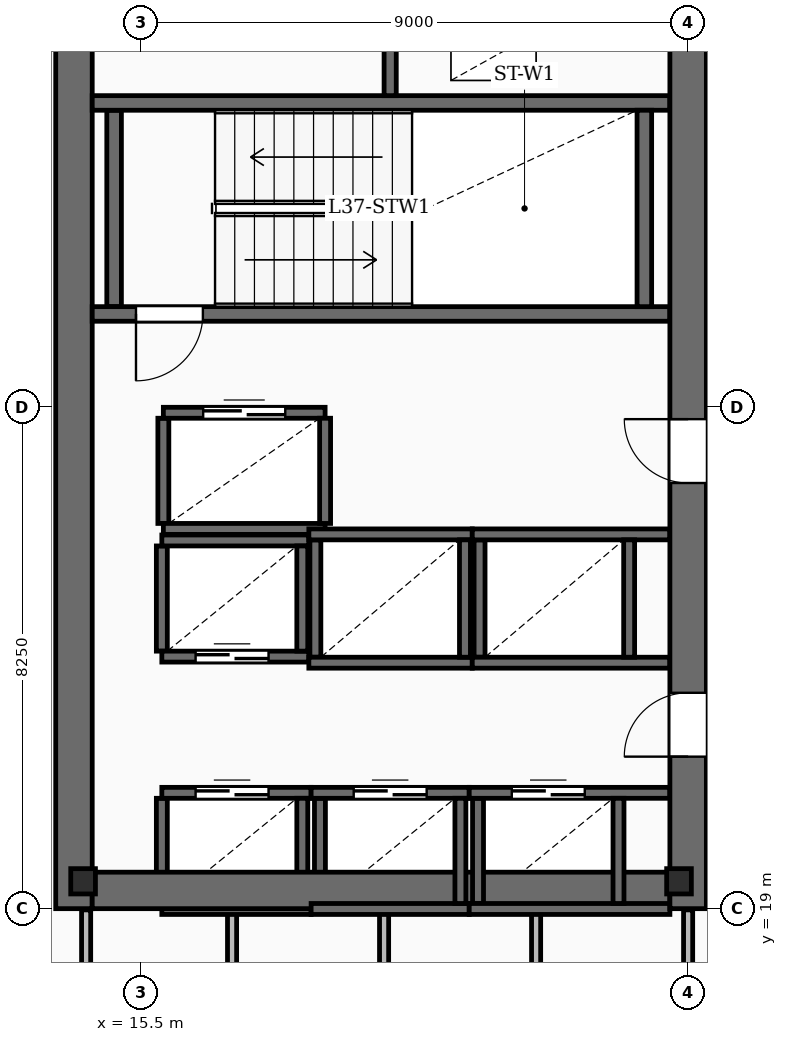
"""IFC4 building model, lengths in metres.
Left out: names, types, materials, properties, quantities, classifications, styles, units other than length and angle.
Written with IfcOpenShell. Run it as: python <this file> out.ifc"""

import sys

from ifc_helpers import new_model, si_unit, direction, frame, frame_2d, origin, origin_2d, place, context, subcontext, project, spatial, rectangle, i_section, extrude, element, fill, save


model = new_model("IFC4")
c1 = context("Model", 3, precision=1e-05, world=origin(), true_north=direction((0.0, 1.0)))
c2 = subcontext(c1, "Body", "Model", "MODEL_VIEW")
j1 = project(units=[si_unit("LENGTHUNIT", "METRE"), si_unit("PLANEANGLEUNIT", "RADIAN")], contexts=[c1])
p1 = place(None, origin())
s1 = spatial("IfcSite", under=j1, at=p1, CompositionType="ELEMENT")
p2 = place(p1, origin())
s2 = spatial("IfcBuilding", under=s1, at=p2, CompositionType="ELEMENT")
p3 = place(p2, frame((0.0, 0.0, 158.45)))
s3 = spatial("IfcBuildingStorey", under=s2, at=p3, CompositionType="ELEMENT", Elevation=158.45)
p4 = place(p3, frame((14.4, 19.0, -0.45), z_axis=(0.0, 0.0, 1.0), x_axis=(0.0, 1.0, 0.0)))
e1 = element("IfcWall", 1, at=p4, inside=s3, PredefinedType="SHEAR", context=c2, shape_type="SweptSolid", body=[
    extrude(rectangle(XDim=15.3, YDim=0.6, at=frame_2d((7.65, 0.0))), origin(), (0.0, 0.0, 1.0), 3.93),
])
p5 = place(p3, frame((24.5, 19.0, -0.45), z_axis=(0.0, 0.0, 1.0), x_axis=(0.0, 1.0, 0.0)))
e2 = element("IfcWall", 2, at=p5, inside=s3, PredefinedType="SHEAR", context=c2, shape_type="SweptSolid", body=[
    extrude(rectangle(XDim=15.3, YDim=0.6, at=frame_2d((7.65, 0.0))), origin(), (0.0, 0.0, 1.0), 3.93),
])
p6 = place(p5, frame((2.5, 0.0, 0.45)))
e3 = element("IfcOpeningElement", 3, at=p6, cuts=e2, PredefinedType="OPENING", context=c2, shape_type="SweptSolid", body=[
    extrude(rectangle(XDim=1.05, YDim=2.15, at=frame_2d((0.525, 1.075))), frame((0.0, 0.31, 0.0), z_axis=(0.0, -1.0, 0.0), x_axis=(1.0, 0.0, 0.0)), (0.0, 0.0, 1.0), 0.62),
])
p7 = place(p5, frame((7.0, 0.0, 0.45)))
e4 = element("IfcOpeningElement", 4, at=p7, cuts=e2, PredefinedType="OPENING", context=c2, shape_type="SweptSolid", body=[
    extrude(rectangle(XDim=1.05, YDim=2.15, at=frame_2d((0.525, 1.075))), frame((0.0, 0.31, 0.0), z_axis=(0.0, -1.0, 0.0), x_axis=(1.0, 0.0, 0.0)), (0.0, 0.0, 1.0), 0.62),
])
p8 = place(p3, frame((14.7, 19.3, -0.45), z_axis=(0.0, 0.0, 1.0), x_axis=(1.0, 0.0, 0.0)))
e5 = element("IfcWall", 5, at=p8, inside=s3, PredefinedType="SHEAR", context=c2, shape_type="SweptSolid", body=[
    extrude(rectangle(XDim=9.5, YDim=0.6, at=frame_2d((4.75, 0.0))), origin(), (0.0, 0.0, 1.0), 3.93),
])
for number, where, z_axis, x_axis in (
    (6, (14.55, 19.45, -0.45), (0.0, 0.0, 1.0), (1.0, 0.0, 0.0)),
    (7, (24.35, 19.45, -0.45), (0.0, 0.0, 1.0), (1.0, 0.0, 0.0)),
):
    element("IfcColumn", number, at=place(p3, frame(where, z_axis=z_axis, x_axis=x_axis)), inside=s3, PredefinedType="COLUMN", context=c2, shape_type="SweptSolid", body=[
        extrude(i_section(OverallWidth=0.406, OverallDepth=0.416, WebThickness=0.03, FlangeThickness=0.048, FilletRadius=0.02, at=origin_2d()), origin(), (0.0, 0.0, 1.0), 3.93),
    ])
p9 = place(p3, frame((24.2, 28.78, 0.0), z_axis=(0.0, 0.0, 1.0), x_axis=(-1.0, 0.0, 0.0)))
e8 = element("IfcWall", 8, at=p9, inside=s3, PredefinedType="SOLIDWALL", context=c2, shape_type="SweptSolid", body=[
    extrude(rectangle(XDim=9.5, YDim=0.24, at=frame_2d((4.75, 0.0))), origin(), (0.0, 0.0, 1.0), 3.48),
])
p10 = place(p9, frame((7.68, 0.0, 0.0)))
e9 = element("IfcOpeningElement", 9, at=p10, cuts=e8, PredefinedType="OPENING", context=c2, shape_type="SweptSolid", body=[
    extrude(rectangle(XDim=1.1, YDim=2.15, at=frame_2d((0.55, 1.075))), frame((0.0, 0.13, 0.0), z_axis=(0.0, -1.0, 0.0), x_axis=(1.0, 0.0, 0.0)), (0.0, 0.0, 1.0), 0.26),
])
p11 = place(p3, frame((14.7, 32.25, 0.0), z_axis=(0.0, 0.0, 1.0), x_axis=(1.0, 0.0, 0.0)))
e10 = element("IfcWall", 10, at=p11, inside=s3, PredefinedType="SOLIDWALL", context=c2, shape_type="SweptSolid", body=[
    extrude(rectangle(XDim=9.5, YDim=0.24, at=frame_2d((4.75, 0.0))), origin(), (0.0, 0.0, 1.0), 3.48),
])
for number, where, z_axis, x_axis in (
    (11, (15.06, 28.9, 0.0), (0.0, 0.0, 1.0), (0.0, 1.0, 0.0)),
    (12, (23.78, 28.9, 0.0), (0.0, 0.0, 1.0), (0.0, 1.0, 0.0)),
):
    element("IfcWall", number, at=place(p3, frame(where, z_axis=z_axis, x_axis=x_axis)), inside=s3, PredefinedType="SOLIDWALL", context=c2, shape_type="SweptSolid", body=[
        extrude(rectangle(XDim=3.23, YDim=0.24, at=frame_2d((1.615, 0.0))), origin(), (0.0, 0.0, 1.0), 3.48),
    ])
p12 = place(p3, frame((19.6, 32.37, 0.0), z_axis=(0.0, 0.0, 1.0), x_axis=(0.0, 1.0, 0.0)))
e13 = element("IfcWall", 13, at=p12, inside=s3, PredefinedType="SOLIDWALL", context=c2, shape_type="SweptSolid", body=[
    extrude(rectangle(XDim=1.28, YDim=0.2, at=frame_2d((0.64, 0.0))), origin(), (0.0, 0.0, 1.0), 3.48),
])
p13 = place(p3, frame((15.845, 20.905, 0.0), z_axis=(0.0, 0.0, 1.0), x_axis=(1.0, 0.0, 0.0)))
e14 = element("IfcWall", 14, at=p13, inside=s3, PredefinedType="SOLIDWALL", context=c2, shape_type="SweptSolid", body=[
    extrude(rectangle(XDim=2.455, YDim=0.18, at=frame_2d((1.228, 0.0))), origin(), (0.0, 0.0, 1.0), 3.48),
])
p14 = place(p13, frame((0.555, 0.0, 0.0)))
e15 = element("IfcOpeningElement", 15, at=p14, cuts=e14, PredefinedType="OPENING", context=c2, shape_type="SweptSolid", body=[
    extrude(rectangle(XDim=1.2, YDim=2.2, at=frame_2d((0.6, 1.1))), frame((0.0, 0.1, 0.0), z_axis=(0.0, -1.0, 0.0), x_axis=(1.0, 0.0, 0.0)), (0.0, 0.0, 1.0), 0.2),
])
p15 = place(p3, frame((15.845, 18.995, 0.0), z_axis=(0.0, 0.0, 1.0), x_axis=(1.0, 0.0, 0.0)))
e16 = element("IfcWall", 16, at=p15, inside=s3, PredefinedType="SOLIDWALL", context=c2, shape_type="SweptSolid", body=[
    extrude(rectangle(XDim=2.455, YDim=0.18, at=frame_2d((1.228, 0.0))), origin(), (0.0, 0.0, 1.0), 3.48),
])
for number, where, z_axis, x_axis in (
    (17, (15.845, 19.085, 0.0), (0.0, 0.0, 1.0), (0.0, 1.0, 0.0)),
    (18, (18.155, 19.085, 0.0), (0.0, 0.0, 1.0), (0.0, 1.0, 0.0)),
):
    element("IfcWall", number, at=place(p3, frame(where, z_axis=z_axis, x_axis=x_axis)), inside=s3, PredefinedType="SOLIDWALL", context=c2, shape_type="SweptSolid", body=[
        extrude(rectangle(XDim=1.73, YDim=0.18, at=frame_2d((0.865, 0.0))), origin(), (0.0, 0.0, 1.0), 3.48),
    ])
p16 = place(p3, frame((18.3, 20.905, 0.0), z_axis=(0.0, 0.0, 1.0), x_axis=(1.0, 0.0, 0.0)))
e19 = element("IfcWall", 19, at=p16, inside=s3, PredefinedType="SOLIDWALL", context=c2, shape_type="SweptSolid", body=[
    extrude(rectangle(XDim=2.6, YDim=0.18, at=frame_2d((1.3, 0.0))), origin(), (0.0, 0.0, 1.0), 3.48),
])
p17 = place(p16, frame((0.7, 0.0, 0.0)))
e20 = element("IfcOpeningElement", 20, at=p17, cuts=e19, PredefinedType="OPENING", context=c2, shape_type="SweptSolid", body=[
    extrude(rectangle(XDim=1.2, YDim=2.2, at=frame_2d((0.6, 1.1))), frame((0.0, 0.1, 0.0), z_axis=(0.0, -1.0, 0.0), x_axis=(1.0, 0.0, 0.0)), (0.0, 0.0, 1.0), 0.2),
])
p18 = place(p3, frame((18.3, 18.995, 0.0), z_axis=(0.0, 0.0, 1.0), x_axis=(1.0, 0.0, 0.0)))
e21 = element("IfcWall", 21, at=p18, inside=s3, PredefinedType="SOLIDWALL", context=c2, shape_type="SweptSolid", body=[
    extrude(rectangle(XDim=2.6, YDim=0.18, at=frame_2d((1.3, 0.0))), origin(), (0.0, 0.0, 1.0), 3.48),
])
for number, where, z_axis, x_axis in (
    (22, (18.445, 19.085, 0.0), (0.0, 0.0, 1.0), (0.0, 1.0, 0.0)),
    (23, (20.755, 19.085, 0.0), (0.0, 0.0, 1.0), (0.0, 1.0, 0.0)),
):
    element("IfcWall", number, at=place(p3, frame(where, z_axis=z_axis, x_axis=x_axis)), inside=s3, PredefinedType="SOLIDWALL", context=c2, shape_type="SweptSolid", body=[
        extrude(rectangle(XDim=1.73, YDim=0.18, at=frame_2d((0.865, 0.0))), origin(), (0.0, 0.0, 1.0), 3.48),
    ])
p19 = place(p3, frame((20.9, 20.905, 0.0), z_axis=(0.0, 0.0, 1.0), x_axis=(1.0, 0.0, 0.0)))
e24 = element("IfcWall", 24, at=p19, inside=s3, PredefinedType="SOLIDWALL", context=c2, shape_type="SweptSolid", body=[
    extrude(rectangle(XDim=3.3, YDim=0.18, at=frame_2d((1.65, 0.0))), origin(), (0.0, 0.0, 1.0), 3.48),
])
p20 = place(p19, frame((0.7, 0.0, 0.0)))
e25 = element("IfcOpeningElement", 25, at=p20, cuts=e24, PredefinedType="OPENING", context=c2, shape_type="SweptSolid", body=[
    extrude(rectangle(XDim=1.2, YDim=2.2, at=frame_2d((0.6, 1.1))), frame((0.0, 0.1, 0.0), z_axis=(0.0, -1.0, 0.0), x_axis=(1.0, 0.0, 0.0)), (0.0, 0.0, 1.0), 0.2),
])
p21 = place(p3, frame((20.9, 18.995, 0.0), z_axis=(0.0, 0.0, 1.0), x_axis=(1.0, 0.0, 0.0)))
e26 = element("IfcWall", 26, at=p21, inside=s3, PredefinedType="SOLIDWALL", context=c2, shape_type="SweptSolid", body=[
    extrude(rectangle(XDim=3.3, YDim=0.18, at=frame_2d((1.65, 0.0))), origin(), (0.0, 0.0, 1.0), 3.48),
])
for number, where, z_axis, x_axis in (
    (27, (21.045, 19.085, 0.0), (0.0, 0.0, 1.0), (0.0, 1.0, 0.0)),
    (28, (23.355, 19.085, 0.0), (0.0, 0.0, 1.0), (0.0, 1.0, 0.0)),
):
    element("IfcWall", number, at=place(p3, frame(where, z_axis=z_axis, x_axis=x_axis)), inside=s3, PredefinedType="SOLIDWALL", context=c2, shape_type="SweptSolid", body=[
        extrude(rectangle(XDim=1.73, YDim=0.18, at=frame_2d((0.865, 0.0))), origin(), (0.0, 0.0, 1.0), 3.48),
    ])
p22 = place(p3, frame((15.845, 25.055, 0.0), z_axis=(0.0, 0.0, 1.0), x_axis=(1.0, 0.0, 0.0)))
e29 = element("IfcWall", 29, at=p22, inside=s3, PredefinedType="SOLIDWALL", context=c2, shape_type="SweptSolid", body=[
    extrude(rectangle(XDim=2.417, YDim=0.18, at=frame_2d((1.209, 0.0))), origin(), (0.0, 0.0, 1.0), 3.48),
])
p23 = place(p3, frame((15.845, 23.145, 0.0), z_axis=(0.0, 0.0, 1.0), x_axis=(1.0, 0.0, 0.0)))
e30 = element("IfcWall", 30, at=p23, inside=s3, PredefinedType="SOLIDWALL", context=c2, shape_type="SweptSolid", body=[
    extrude(rectangle(XDim=2.417, YDim=0.18, at=frame_2d((1.209, 0.0))), origin(), (0.0, 0.0, 1.0), 3.48),
])
p24 = place(p23, frame((0.555, 0.0, 0.0)))
e31 = element("IfcOpeningElement", 31, at=p24, cuts=e30, PredefinedType="OPENING", context=c2, shape_type="SweptSolid", body=[
    extrude(rectangle(XDim=1.2, YDim=2.2, at=frame_2d((0.6, 1.1))), frame((0.0, 0.1, 0.0), z_axis=(0.0, -1.0, 0.0), x_axis=(1.0, 0.0, 0.0)), (0.0, 0.0, 1.0), 0.2),
])
for number, where, z_axis, x_axis in (
    (32, (15.845, 23.235, 0.0), (0.0, 0.0, 1.0), (0.0, 1.0, 0.0)),
    (33, (18.155, 23.235, 0.0), (0.0, 0.0, 1.0), (0.0, 1.0, 0.0)),
):
    element("IfcWall", number, at=place(p3, frame(where, z_axis=z_axis, x_axis=x_axis)), inside=s3, PredefinedType="SOLIDWALL", context=c2, shape_type="SweptSolid", body=[
        extrude(rectangle(XDim=1.73, YDim=0.18, at=frame_2d((0.865, 0.0))), origin(), (0.0, 0.0, 1.0), 3.48),
    ])
for number, where, z_axis, x_axis in (
    (34, (18.262, 25.155, 0.0), (0.0, 0.0, 1.0), (1.0, 0.0, 0.0)),
    (35, (18.262, 23.045, 0.0), (0.0, 0.0, 1.0), (1.0, 0.0, 0.0)),
):
    element("IfcWall", number, at=place(p3, frame(where, z_axis=z_axis, x_axis=x_axis)), inside=s3, PredefinedType="SOLIDWALL", context=c2, shape_type="SweptSolid", body=[
        extrude(rectangle(XDim=2.688, YDim=0.18, at=frame_2d((1.344, 0.0))), origin(), (0.0, 0.0, 1.0), 3.48),
    ])
for number, where, z_axis, x_axis in (
    (36, (18.37, 23.135, 0.0), (0.0, 0.0, 1.0), (0.0, 1.0, 0.0)),
    (37, (20.83, 23.135, 0.0), (0.0, 0.0, 1.0), (0.0, 1.0, 0.0)),
):
    element("IfcWall", number, at=place(p3, frame(where, z_axis=z_axis, x_axis=x_axis)), inside=s3, PredefinedType="SOLIDWALL", context=c2, shape_type="SweptSolid", body=[
        extrude(rectangle(XDim=1.93, YDim=0.18, at=frame_2d((0.965, 0.0))), origin(), (0.0, 0.0, 1.0), 3.48),
    ])
for number, where, z_axis, x_axis in (
    (38, (20.95, 25.155, 0.0), (0.0, 0.0, 1.0), (1.0, 0.0, 0.0)),
    (39, (20.95, 23.045, 0.0), (0.0, 0.0, 1.0), (1.0, 0.0, 0.0)),
):
    element("IfcWall", number, at=place(p3, frame(where, z_axis=z_axis, x_axis=x_axis)), inside=s3, PredefinedType="SOLIDWALL", context=c2, shape_type="SweptSolid", body=[
        extrude(rectangle(XDim=3.25, YDim=0.18, at=frame_2d((1.625, 0.0))), origin(), (0.0, 0.0, 1.0), 3.48),
    ])
for number, where, z_axis, x_axis in (
    (40, (21.07, 23.135, 0.0), (0.0, 0.0, 1.0), (0.0, 1.0, 0.0)),
    (41, (23.53, 23.135, 0.0), (0.0, 0.0, 1.0), (0.0, 1.0, 0.0)),
):
    element("IfcWall", number, at=place(p3, frame(where, z_axis=z_axis, x_axis=x_axis)), inside=s3, PredefinedType="SOLIDWALL", context=c2, shape_type="SweptSolid", body=[
        extrude(rectangle(XDim=1.93, YDim=0.18, at=frame_2d((0.965, 0.0))), origin(), (0.0, 0.0, 1.0), 3.48),
    ])
p25 = place(p3, frame((15.87, 27.155, 0.0), z_axis=(0.0, 0.0, 1.0), x_axis=(1.0, 0.0, 0.0)))
e42 = element("IfcWall", 42, at=p25, inside=s3, PredefinedType="SOLIDWALL", context=c2, shape_type="SweptSolid", body=[
    extrude(rectangle(XDim=2.66, YDim=0.18, at=frame_2d((1.33, 0.0))), origin(), (0.0, 0.0, 1.0), 3.48),
])
p26 = place(p25, frame((0.655, 0.0, 0.0)))
e43 = element("IfcOpeningElement", 43, at=p26, cuts=e42, PredefinedType="OPENING", context=c2, shape_type="SweptSolid", body=[
    extrude(rectangle(XDim=1.35, YDim=2.3, at=frame_2d((0.675, 1.15))), frame((0.0, 0.1, 0.0), z_axis=(0.0, -1.0, 0.0), x_axis=(1.0, 0.0, 0.0)), (0.0, 0.0, 1.0), 0.2),
])
p27 = place(p3, frame((15.87, 25.245, 0.0), z_axis=(0.0, 0.0, 1.0), x_axis=(1.0, 0.0, 0.0)))
e44 = element("IfcWall", 44, at=p27, inside=s3, PredefinedType="SOLIDWALL", context=c2, shape_type="SweptSolid", body=[
    extrude(rectangle(XDim=2.66, YDim=0.18, at=frame_2d((1.33, 0.0))), origin(), (0.0, 0.0, 1.0), 3.48),
])
for number, where, z_axis, x_axis in (
    (45, (15.87, 25.335, 0.0), (0.0, 0.0, 1.0), (0.0, 1.0, 0.0)),
    (46, (18.53, 25.335, 0.0), (0.0, 0.0, 1.0), (0.0, 1.0, 0.0)),
):
    element("IfcWall", number, at=place(p3, frame(where, z_axis=z_axis, x_axis=x_axis)), inside=s3, PredefinedType="SOLIDWALL", context=c2, shape_type="SweptSolid", body=[
        extrude(rectangle(XDim=1.73, YDim=0.18, at=frame_2d((0.865, 0.0))), origin(), (0.0, 0.0, 1.0), 3.48),
    ])
for number, where, z_axis, x_axis in (
    (47, (17.0, 15.4, 0.0), (0.0, 0.0, 1.0), (0.0, 1.0, 0.0)),
    (48, (19.5, 15.4, 0.0), (0.0, 0.0, 1.0), (0.0, 1.0, 0.0)),
    (49, (22.0, 15.4, 0.0), (0.0, 0.0, 1.0), (0.0, 1.0, 0.0)),
    (50, (14.6, 15.4, 0.0), (0.0, 0.0, 1.0), (0.0, 1.0, 0.0)),
    (51, (24.5, 15.4, 0.0), (0.0, 0.0, 1.0), (0.0, 1.0, 0.0)),
):
    element("IfcWall", number, at=place(p3, frame(where, z_axis=z_axis, x_axis=x_axis)), inside=s3, PredefinedType="PARTITIONING", context=c2, shape_type="SweptSolid", body=[
        extrude(rectangle(XDim=3.58, YDim=0.15, at=frame_2d((1.79, 0.0))), origin(), (0.0, 0.0, 1.0), 2.54),
    ])
p28 = place(p6, origin())
e52 = element("IfcDoor", 52, at=p28, inside=s3, OperationType="SINGLE_SWING_LEFT", PredefinedType="DOOR", context=c2, shape_type="SweptSolid", body=[
    extrude(rectangle(XDim=1.05, YDim=2.15, at=frame_2d((0.525, 1.075))), frame((0.0, 0.025, 0.0), z_axis=(0.0, -1.0, 0.0), x_axis=(1.0, 0.0, 0.0)), (0.0, 0.0, 1.0), 0.05),
])
fill(e3, e52)
p29 = place(p7, origin())
e53 = element("IfcDoor", 53, at=p29, inside=s3, OperationType="SINGLE_SWING_RIGHT", PredefinedType="DOOR", context=c2, shape_type="SweptSolid", body=[
    extrude(rectangle(XDim=1.05, YDim=2.15, at=frame_2d((0.525, 1.075))), frame((0.0, 0.025, 0.0), z_axis=(0.0, -1.0, 0.0), x_axis=(1.0, 0.0, 0.0)), (0.0, 0.0, 1.0), 0.05),
])
fill(e4, e53)
p30 = place(p10, origin())
e54 = element("IfcDoor", 54, at=p30, inside=s3, OperationType="SINGLE_SWING_RIGHT", PredefinedType="DOOR", context=c2, shape_type="SweptSolid", body=[
    extrude(rectangle(XDim=1.1, YDim=2.15, at=frame_2d((0.55, 1.075))), frame((0.0, 0.025, 0.0), z_axis=(0.0, -1.0, 0.0), x_axis=(1.0, 0.0, 0.0)), (0.0, 0.0, 1.0), 0.05),
])
fill(e9, e54)
p31 = place(p14, origin())
e55 = element("IfcDoor", 55, at=p31, inside=s3, OperationType="DOUBLE_DOOR_SLIDING", PredefinedType="DOOR", context=c2, shape_type="SweptSolid", body=[
    extrude(rectangle(XDim=1.2, YDim=2.2, at=frame_2d((0.6, 1.1))), frame((0.0, 0.025, 0.0), z_axis=(0.0, -1.0, 0.0), x_axis=(1.0, 0.0, 0.0)), (0.0, 0.0, 1.0), 0.05),
])
fill(e15, e55)
p32 = place(p17, origin())
e56 = element("IfcDoor", 56, at=p32, inside=s3, OperationType="DOUBLE_DOOR_SLIDING", PredefinedType="DOOR", context=c2, shape_type="SweptSolid", body=[
    extrude(rectangle(XDim=1.2, YDim=2.2, at=frame_2d((0.6, 1.1))), frame((0.0, 0.025, 0.0), z_axis=(0.0, -1.0, 0.0), x_axis=(1.0, 0.0, 0.0)), (0.0, 0.0, 1.0), 0.05),
])
fill(e20, e56)
p33 = place(p20, origin())
e57 = element("IfcDoor", 57, at=p33, inside=s3, OperationType="DOUBLE_DOOR_SLIDING", PredefinedType="DOOR", context=c2, shape_type="SweptSolid", body=[
    extrude(rectangle(XDim=1.2, YDim=2.2, at=frame_2d((0.6, 1.1))), frame((0.0, 0.025, 0.0), z_axis=(0.0, -1.0, 0.0), x_axis=(1.0, 0.0, 0.0)), (0.0, 0.0, 1.0), 0.05),
])
fill(e25, e57)
p34 = place(p24, origin())
e58 = element("IfcDoor", 58, at=p34, inside=s3, OperationType="DOUBLE_DOOR_SLIDING", PredefinedType="DOOR", context=c2, shape_type="SweptSolid", body=[
    extrude(rectangle(XDim=1.2, YDim=2.2, at=frame_2d((0.6, 1.1))), frame((0.0, 0.025, 0.0), z_axis=(0.0, -1.0, 0.0), x_axis=(1.0, 0.0, 0.0)), (0.0, 0.0, 1.0), 0.05),
])
fill(e31, e58)
p35 = place(p26, origin())
e59 = element("IfcDoor", 59, at=p35, inside=s3, OperationType="DOUBLE_DOOR_SLIDING", PredefinedType="DOOR", context=c2, shape_type="SweptSolid", body=[
    extrude(rectangle(XDim=1.35, YDim=2.3, at=frame_2d((0.675, 1.15))), frame((0.0, 0.025, 0.0), z_axis=(0.0, -1.0, 0.0), x_axis=(1.0, 0.0, 0.0)), (0.0, 0.0, 1.0), 0.05),
])
fill(e43, e59)
save(model, sys.argv[1])
